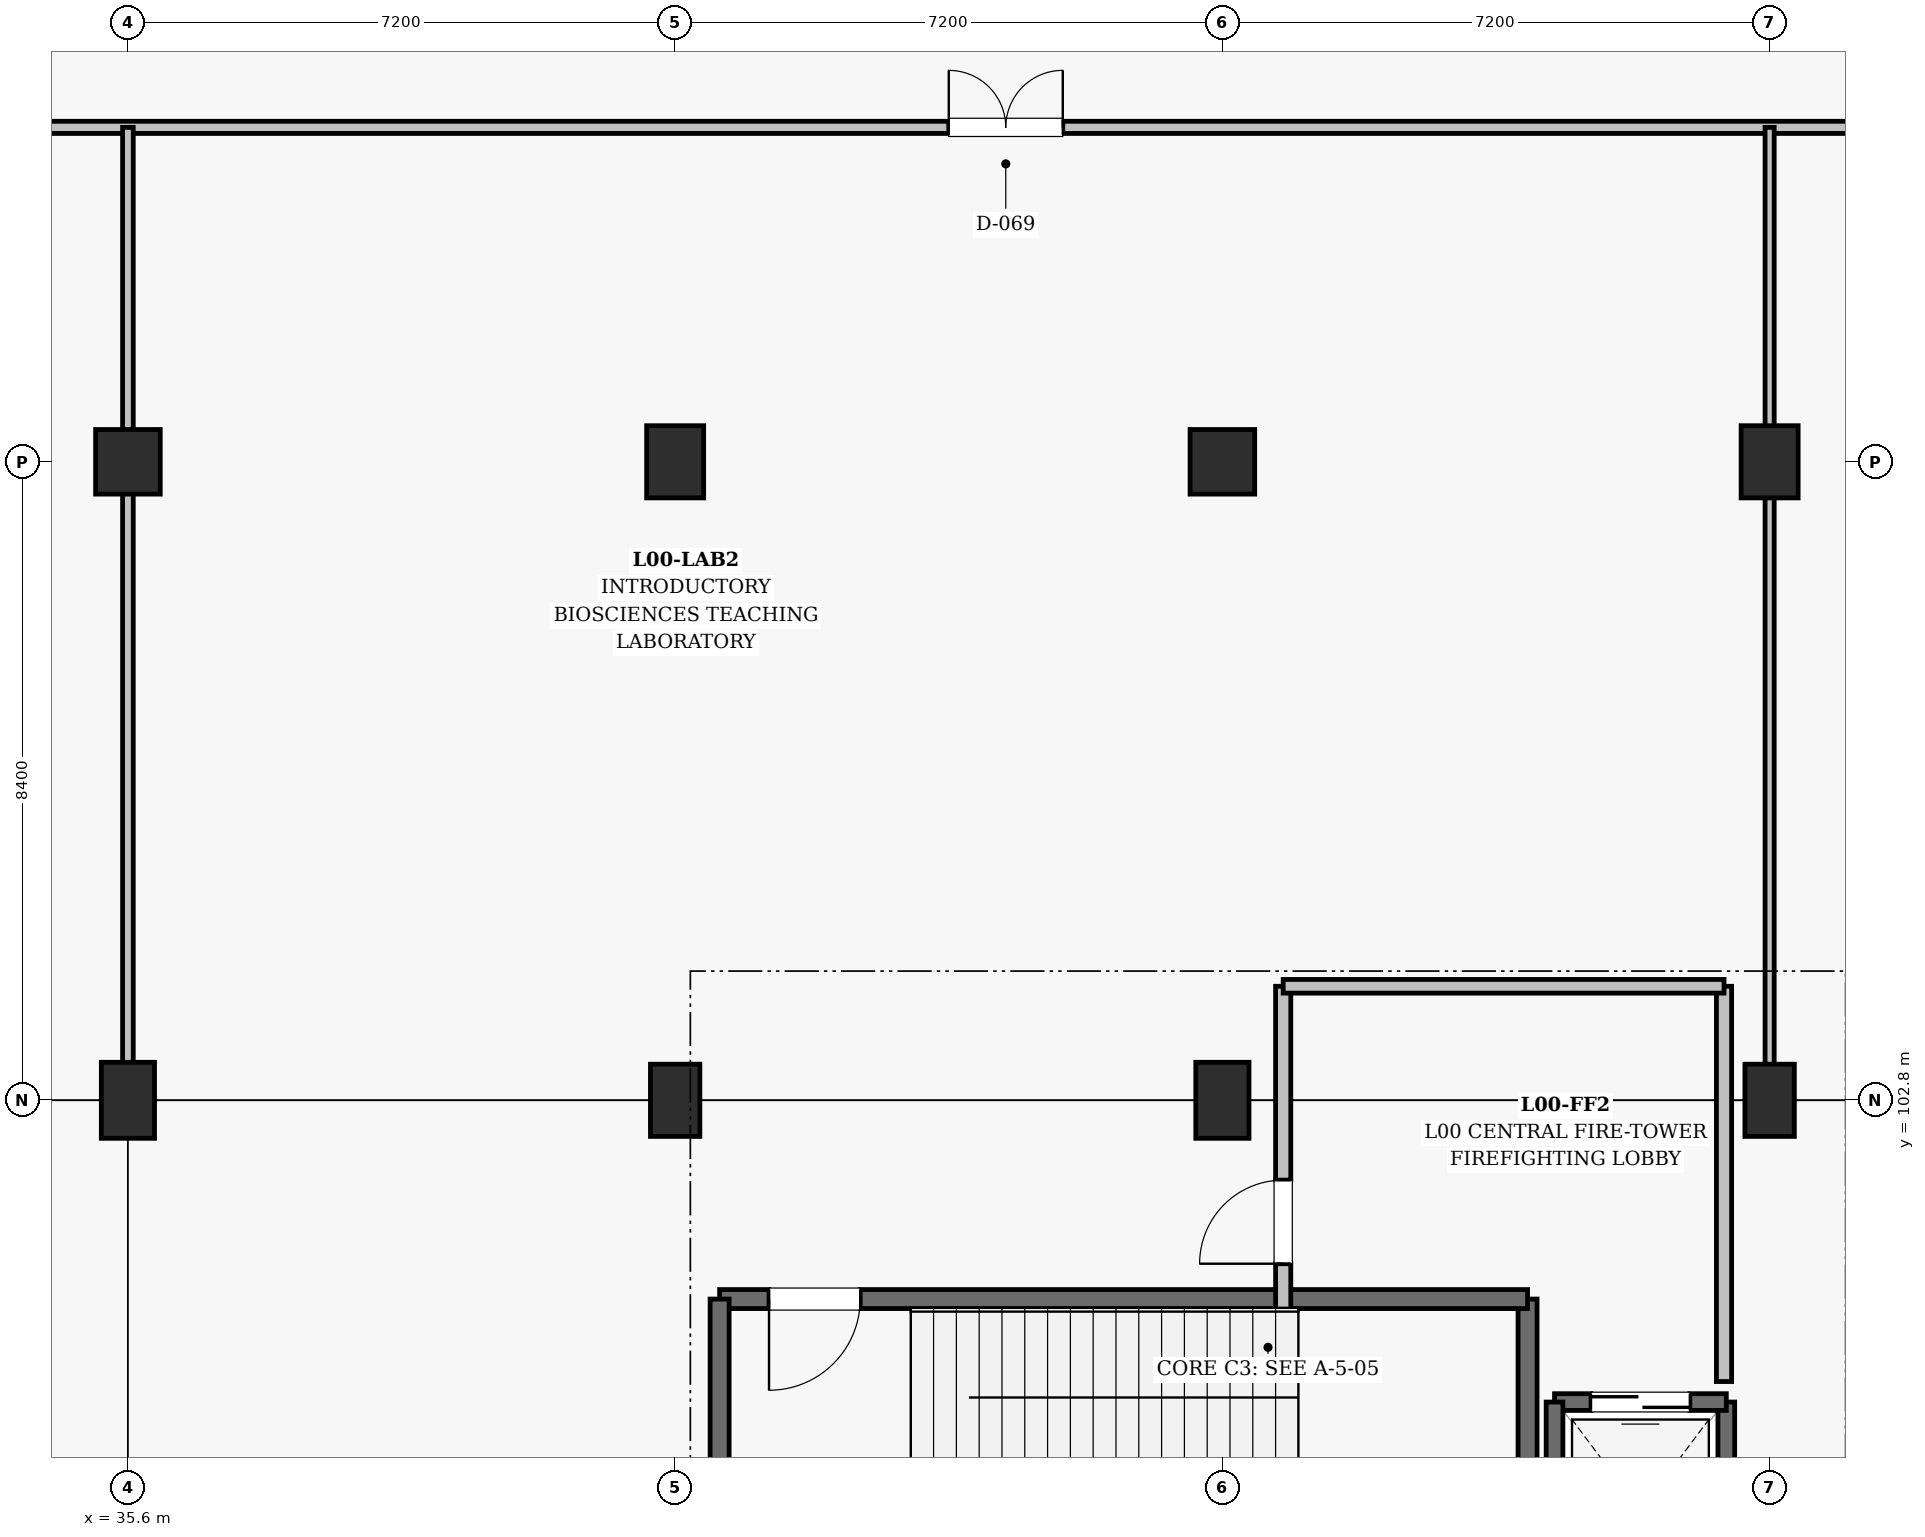
"""IFC4 building model, lengths in metres.
Left out: names, types, materials, properties, quantities, classifications, styles, units other than length and angle.
Written with IfcOpenShell. Run it as: python <this file> out.ifc"""

import sys

from ifc_helpers import new_model, si_unit, direction, frame, frame_2d, origin, origin_2d, place, context, subcontext, project, spatial, rectangle, extrude, element, fill, save


model = new_model("IFC4")
c1 = context("Model", 3, precision=1e-05, world=origin(), true_north=direction((0.0, 1.0)))
c2 = subcontext(c1, "Body", "Model", "MODEL_VIEW")
j1 = project(units=[si_unit("LENGTHUNIT", "METRE"), si_unit("PLANEANGLEUNIT", "RADIAN")], contexts=[c1])
p1 = place(None, origin())
s1 = spatial("IfcSite", under=j1, at=p1, CompositionType="ELEMENT")
p2 = place(p1, origin())
s2 = spatial("IfcBuilding", under=s1, at=p2, CompositionType="ELEMENT")
p3 = place(p2, origin())
s3 = spatial("IfcBuildingStorey", under=s2, at=p3, CompositionType="ELEMENT", Elevation=0.0)
p4 = place(p3, frame((35.6, 102.8, 0.0), z_axis=(0.0, 0.0, 1.0), x_axis=(1.0, 0.0, 0.0)))
e1 = element("IfcColumn", 1, at=p4, inside=s3, PredefinedType="COLUMN", context=c2, shape_type="SweptSolid", body=[
    extrude(rectangle(XDim=0.7, YDim=1.0, at=origin_2d()), origin(), (0.0, 0.0, 1.0), 5.4),
])
p5 = place(p3, frame((35.6, 111.2, 0.0), z_axis=(0.0, 0.0, 1.0), x_axis=(1.0, 0.0, 0.0)))
e2 = element("IfcColumn", 2, at=p5, inside=s3, PredefinedType="COLUMN", context=c2, shape_type="SweptSolid", body=[
    extrude(rectangle(XDim=0.85, YDim=0.85, at=origin_2d()), origin(), (0.0, 0.0, 1.0), 5.4),
])
p6 = place(p3, frame((42.8, 102.8, 0.0), z_axis=(0.0, 0.0, 1.0), x_axis=(1.0, 0.0, 0.0)))
e3 = element("IfcColumn", 3, at=p6, inside=s3, PredefinedType="COLUMN", context=c2, shape_type="SweptSolid", body=[
    extrude(rectangle(XDim=0.65, YDim=0.95, at=origin_2d()), origin(), (0.0, 0.0, 1.0), 5.4),
])
p7 = place(p3, frame((42.8, 111.2, 0.0), z_axis=(0.0, 0.0, 1.0), x_axis=(1.0, 0.0, 0.0)))
e4 = element("IfcColumn", 4, at=p7, inside=s3, PredefinedType="COLUMN", context=c2, shape_type="SweptSolid", body=[
    extrude(rectangle(XDim=0.75, YDim=0.95, at=origin_2d()), origin(), (0.0, 0.0, 1.0), 5.4),
])
p8 = place(p3, frame((50.0, 102.8, 0.0), z_axis=(0.0, 0.0, 1.0), x_axis=(1.0, 0.0, 0.0)))
e5 = element("IfcColumn", 5, at=p8, inside=s3, PredefinedType="COLUMN", context=c2, shape_type="SweptSolid", body=[
    extrude(rectangle(XDim=0.7, YDim=1.0, at=origin_2d()), origin(), (0.0, 0.0, 1.0), 5.4),
])
p9 = place(p3, frame((50.0, 111.2, 0.0), z_axis=(0.0, 0.0, 1.0), x_axis=(1.0, 0.0, 0.0)))
e6 = element("IfcColumn", 6, at=p9, inside=s3, PredefinedType="COLUMN", context=c2, shape_type="SweptSolid", body=[
    extrude(rectangle(XDim=0.85, YDim=0.85, at=origin_2d()), origin(), (0.0, 0.0, 1.0), 5.4),
])
p10 = place(p3, frame((57.2, 102.8, 0.0), z_axis=(0.0, 0.0, 1.0), x_axis=(1.0, 0.0, 0.0)))
e7 = element("IfcColumn", 7, at=p10, inside=s3, PredefinedType="COLUMN", context=c2, shape_type="SweptSolid", body=[
    extrude(rectangle(XDim=0.65, YDim=0.95, at=origin_2d()), origin(), (0.0, 0.0, 1.0), 5.4),
])
p11 = place(p3, frame((57.2, 111.2, 0.0), z_axis=(0.0, 0.0, 1.0), x_axis=(1.0, 0.0, 0.0)))
e8 = element("IfcColumn", 8, at=p11, inside=s3, PredefinedType="COLUMN", context=c2, shape_type="SweptSolid", body=[
    extrude(rectangle(XDim=0.75, YDim=0.95, at=origin_2d()), origin(), (0.0, 0.0, 1.0), 5.4),
])
p12 = place(p3, frame((54.015, 95.085, 0.0), z_axis=(0.0, 0.0, 1.0), x_axis=(0.0, 1.0, 0.0)))
e9 = element("IfcWall", 9, at=p12, inside=s3, PredefinedType="SHEAR", context=c2, shape_type="SweptSolid", body=[
    extrude(rectangle(XDim=5.1, YDim=0.25, at=frame_2d((2.55, 0.0))), origin(), (0.0, 0.0, 1.0), 5.115),
])
p13 = place(p3, frame((54.015, 100.185, 0.0), z_axis=(0.0, 0.0, 1.0), x_axis=(-1.0, 0.0, 0.0)))
e10 = element("IfcWall", 10, at=p13, inside=s3, PredefinedType="SHEAR", context=c2, shape_type="SweptSolid", body=[
    extrude(rectangle(XDim=10.63, YDim=0.25, at=frame_2d((5.315, 0.0))), origin(), (0.0, 0.0, 1.0), 5.115),
])
p14 = place(p13, frame((8.78, 0.0, 0.0)))
e11 = element("IfcOpeningElement", 11, at=p14, cuts=e10, PredefinedType="OPENING", context=c2, shape_type="SweptSolid", body=[
    extrude(rectangle(XDim=1.2, YDim=2.15, at=frame_2d((0.6, 1.075))), frame((0.0, 0.135, 0.0), z_axis=(0.0, -1.0, 0.0), x_axis=(1.0, 0.0, 0.0)), (0.0, 0.0, 1.0), 0.27),
])
p15 = place(p3, frame((43.385, 100.185, 0.0), z_axis=(0.0, 0.0, 1.0), x_axis=(0.0, -1.0, 0.0)))
e12 = element("IfcWall", 12, at=p15, inside=s3, PredefinedType="SHEAR", context=c2, shape_type="SweptSolid", body=[
    extrude(rectangle(XDim=5.1, YDim=0.25, at=frame_2d((2.55, 0.0))), origin(), (0.0, 0.0, 1.0), 5.115),
])
p16 = place(p3, frame((56.63, 95.97, 0.0), z_axis=(0.0, 0.0, 1.0), x_axis=(0.0, 1.0, 0.0)))
e13 = element("IfcWall", 13, at=p16, inside=s3, PredefinedType="SHEAR", context=c2, shape_type="SweptSolid", body=[
    extrude(rectangle(XDim=2.86, YDim=0.22, at=frame_2d((1.43, 0.0))), origin(), (0.0, 0.0, 1.0), 5.115),
])
p17 = place(p3, frame((56.63, 98.83, 0.0), z_axis=(0.0, 0.0, 1.0), x_axis=(-1.0, 0.0, 0.0)))
e14 = element("IfcWall", 14, at=p17, inside=s3, PredefinedType="SHEAR", context=c2, shape_type="SweptSolid", body=[
    extrude(rectangle(XDim=2.26, YDim=0.22, at=frame_2d((1.13, 0.0))), origin(), (0.0, 0.0, 1.0), 5.115),
])
p18 = place(p17, frame((0.48, 0.0, 0.0)))
e15 = element("IfcOpeningElement", 15, at=p18, cuts=e14, PredefinedType="OPENING", context=c2, shape_type="SweptSolid", body=[
    extrude(rectangle(XDim=1.3, YDim=2.2, at=frame_2d((0.65, 1.1))), frame((0.0, 0.12, 0.0), z_axis=(0.0, -1.0, 0.0), x_axis=(1.0, 0.0, 0.0)), (0.0, 0.0, 1.0), 0.24),
])
p19 = place(p3, frame((54.37, 98.83, 0.0), z_axis=(0.0, 0.0, 1.0), x_axis=(0.0, -1.0, 0.0)))
e16 = element("IfcWall", 16, at=p19, inside=s3, PredefinedType="SHEAR", context=c2, shape_type="SweptSolid", body=[
    extrude(rectangle(XDim=2.86, YDim=0.22, at=frame_2d((1.43, 0.0))), origin(), (0.0, 0.0, 1.0), 5.115),
])
p20 = place(p3, frame((50.8, 99.1, 0.0), z_axis=(0.0, 0.0, 1.0), x_axis=(0.0, 1.0, 0.0)))
e17 = element("IfcWall", 17, at=p20, inside=s3, PredefinedType="SOLIDWALL", context=c2, shape_type="SweptSolid", body=[
    extrude(rectangle(XDim=5.2, YDim=0.2, at=frame_2d((2.6, 0.0))), origin(), (0.0, 0.0, 1.0), 4.26),
])
p21 = place(p20, frame((1.55, 0.0, 0.0)))
e18 = element("IfcOpeningElement", 18, at=p21, cuts=e17, PredefinedType="OPENING", context=c2, shape_type="SweptSolid", body=[
    extrude(rectangle(XDim=1.1, YDim=2.15, at=frame_2d((0.55, 1.075))), frame((0.0, 0.11, 0.0), z_axis=(0.0, -1.0, 0.0), x_axis=(1.0, 0.0, 0.0)), (0.0, 0.0, 1.0), 0.22),
])
p22 = place(p3, frame((56.6, 99.1, 0.0), z_axis=(0.0, 0.0, 1.0), x_axis=(0.0, 1.0, 0.0)))
e19 = element("IfcWall", 19, at=p22, inside=s3, PredefinedType="SOLIDWALL", context=c2, shape_type="SweptSolid", body=[
    extrude(rectangle(XDim=5.2, YDim=0.2, at=frame_2d((2.6, 0.0))), origin(), (0.0, 0.0, 1.0), 4.26),
])
p23 = place(p3, frame((50.8, 104.3, 0.0), z_axis=(0.0, 0.0, 1.0), x_axis=(1.0, 0.0, 0.0)))
e20 = element("IfcWall", 20, at=p23, inside=s3, PredefinedType="SOLIDWALL", context=c2, shape_type="SweptSolid", body=[
    extrude(rectangle(XDim=5.8, YDim=0.18, at=frame_2d((2.9, 0.0))), origin(), (0.0, 0.0, 1.0), 4.46),
])
p24 = place(p3, frame((14.0, 115.6, 0.0), z_axis=(0.0, 0.0, 1.0), x_axis=(1.0, 0.0, 0.0)))
e21 = element("IfcWall", 21, at=p24, inside=s3, PredefinedType="PARTITIONING", context=c2, shape_type="SweptSolid", body=[
    extrude(rectangle(XDim=100.8, YDim=0.16, at=frame_2d((50.4, 0.0))), origin(), (0.0, 0.0, 1.0), 3.82),
])
p25 = place(p24, frame((11.0, 0.0, 0.0)))
e22 = element("IfcOpeningElement", 22, at=p25, cuts=e21, PredefinedType="OPENING", context=c2, shape_type="SweptSolid", body=[
    extrude(rectangle(XDim=1.75, YDim=2.25, at=frame_2d((0.875, 1.125))), frame((0.0, 0.09, 0.0), z_axis=(0.0, -1.0, 0.0), x_axis=(1.0, 0.0, 0.0)), (0.0, 0.0, 1.0), 0.18),
])
p26 = place(p24, frame((32.4, 0.0, 0.0)))
e23 = element("IfcOpeningElement", 23, at=p26, cuts=e21, PredefinedType="OPENING", context=c2, shape_type="SweptSolid", body=[
    extrude(rectangle(XDim=1.5, YDim=2.25, at=frame_2d((0.75, 1.125))), frame((0.0, 0.09, 0.0), z_axis=(0.0, -1.0, 0.0), x_axis=(1.0, 0.0, 0.0)), (0.0, 0.0, 1.0), 0.18),
])
p27 = place(p24, frame((54.0, 0.0, 0.0)))
e24 = element("IfcOpeningElement", 24, at=p27, cuts=e21, PredefinedType="OPENING", context=c2, shape_type="SweptSolid", body=[
    extrude(rectangle(XDim=1.5, YDim=2.25, at=frame_2d((0.75, 1.125))), frame((0.0, 0.09, 0.0), z_axis=(0.0, -1.0, 0.0), x_axis=(1.0, 0.0, 0.0)), (0.0, 0.0, 1.0), 0.18),
])
p28 = place(p24, frame((73.8, 0.0, 0.0)))
e25 = element("IfcOpeningElement", 25, at=p28, cuts=e21, PredefinedType="OPENING", context=c2, shape_type="SweptSolid", body=[
    extrude(rectangle(XDim=1.5, YDim=2.25, at=frame_2d((0.75, 1.125))), frame((0.0, 0.09, 0.0), z_axis=(0.0, -1.0, 0.0), x_axis=(1.0, 0.0, 0.0)), (0.0, 0.0, 1.0), 0.18),
])
p29 = place(p24, frame((91.6, 0.0, 0.0)))
e26 = element("IfcOpeningElement", 26, at=p29, cuts=e21, PredefinedType="OPENING", context=c2, shape_type="SweptSolid", body=[
    extrude(rectangle(XDim=1.6, YDim=2.25, at=frame_2d((0.8, 1.125))), frame((0.0, 0.09, 0.0), z_axis=(0.0, -1.0, 0.0), x_axis=(1.0, 0.0, 0.0)), (0.0, 0.0, 1.0), 0.18),
])
p30 = place(p3, frame((35.6, 102.8, 0.0), z_axis=(0.0, 0.0, 1.0), x_axis=(0.0, 1.0, 0.0)))
e27 = element("IfcWall", 27, at=p30, inside=s3, PredefinedType="PARTITIONING", context=c2, shape_type="SweptSolid", body=[
    extrude(rectangle(XDim=12.8, YDim=0.14, at=frame_2d((6.4, 0.0))), origin(), (0.0, 0.0, 1.0), 3.86),
])
p31 = place(p3, frame((57.2, 102.8, 0.0), z_axis=(0.0, 0.0, 1.0), x_axis=(0.0, 1.0, 0.0)))
e28 = element("IfcWall", 28, at=p31, inside=s3, PredefinedType="PARTITIONING", context=c2, shape_type="SweptSolid", body=[
    extrude(rectangle(XDim=12.8, YDim=0.12, at=frame_2d((6.4, 0.0))), origin(), (0.0, 0.0, 1.0), 4.26),
])
p32 = place(p14, origin())
e29 = element("IfcDoor", 29, at=p32, inside=s3, OperationType="SINGLE_SWING_RIGHT", PredefinedType="DOOR", context=c2, shape_type="SweptSolid", body=[
    extrude(rectangle(XDim=1.2, YDim=2.15, at=frame_2d((0.6, 1.075))), frame((0.0, 0.025, 0.0), z_axis=(0.0, -1.0, 0.0), x_axis=(1.0, 0.0, 0.0)), (0.0, 0.0, 1.0), 0.05),
])
fill(e11, e29)
p33 = place(p18, origin())
e30 = element("IfcDoor", 30, at=p33, inside=s3, OperationType="DOUBLE_DOOR_SLIDING", PredefinedType="DOOR", context=c2, shape_type="SweptSolid", body=[
    extrude(rectangle(XDim=1.3, YDim=2.2, at=frame_2d((0.65, 1.1))), frame((0.0, 0.025, 0.0), z_axis=(0.0, -1.0, 0.0), x_axis=(1.0, 0.0, 0.0)), (0.0, 0.0, 1.0), 0.05),
])
fill(e15, e30)
p34 = place(p21, origin())
e31 = element("IfcDoor", 31, at=p34, inside=s3, OperationType="SINGLE_SWING_LEFT", PredefinedType="DOOR", context=c2, shape_type="SweptSolid", body=[
    extrude(rectangle(XDim=1.1, YDim=2.15, at=frame_2d((0.55, 1.075))), frame((0.0, 0.025, 0.0), z_axis=(0.0, -1.0, 0.0), x_axis=(1.0, 0.0, 0.0)), (0.0, 0.0, 1.0), 0.05),
])
fill(e18, e31)
p35 = place(p26, origin())
e32 = element("IfcDoor", 32, at=p35, inside=s3, OperationType="DOUBLE_DOOR_SINGLE_SWING", PredefinedType="DOOR", context=c2, shape_type="SweptSolid", body=[
    extrude(rectangle(XDim=1.5, YDim=2.25, at=frame_2d((0.75, 1.125))), frame((0.0, 0.025, 0.0), z_axis=(0.0, -1.0, 0.0), x_axis=(1.0, 0.0, 0.0)), (0.0, 0.0, 1.0), 0.05),
])
fill(e23, e32)
save(model, sys.argv[1])
